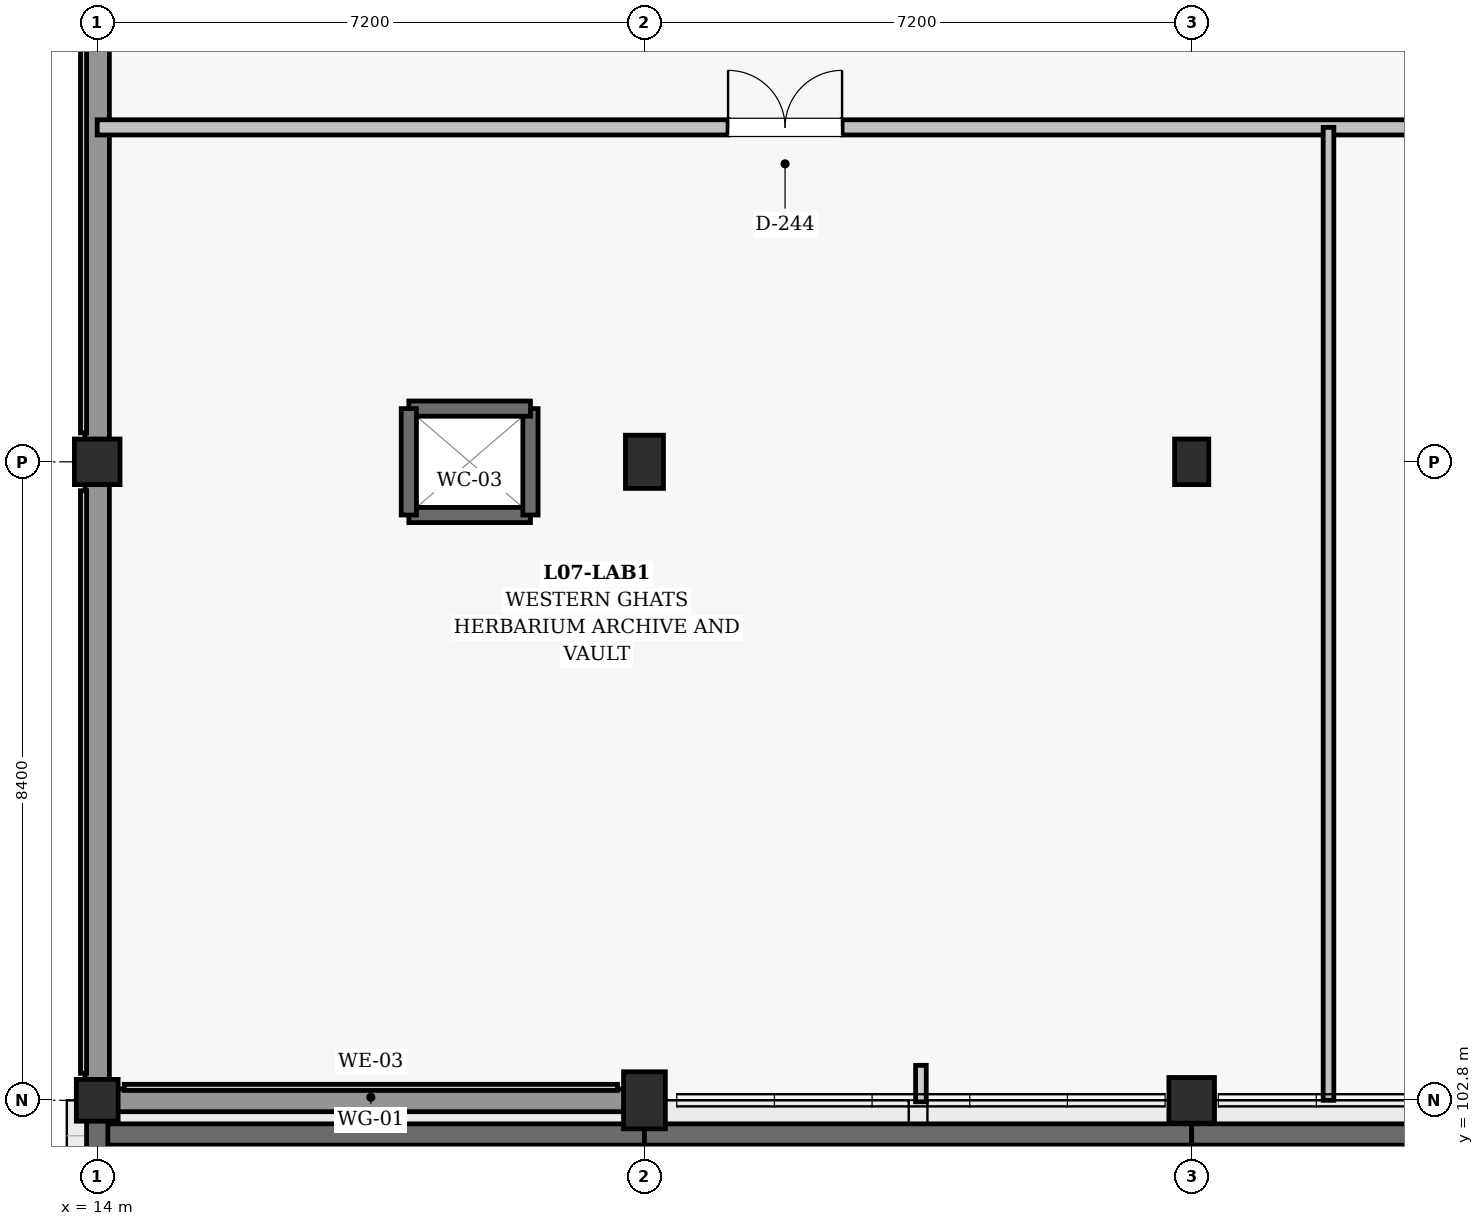
"""IFC4 building model, lengths in metres.
Left out: names, types, materials, properties, quantities, classifications, styles, units other than length and angle.
Written with IfcOpenShell. Run it as: python <this file> out.ifc"""

import sys

from ifc_helpers import new_model, si_unit, direction, frame, frame_2d, origin, origin_2d, place, context, subcontext, project, spatial, polyline, rectangle, outline, extrude, element, fill, save


model = new_model("IFC4")
c1 = context("Model", 3, precision=1e-05, world=origin(), true_north=direction((0.0, 1.0)))
c2 = subcontext(c1, "Body", "Model", "MODEL_VIEW")
j1 = project(units=[si_unit("LENGTHUNIT", "METRE"), si_unit("PLANEANGLEUNIT", "RADIAN")], contexts=[c1])
p1 = place(None, origin())
s1 = spatial("IfcSite", under=j1, at=p1, CompositionType="ELEMENT")
p2 = place(p1, origin())
s2 = spatial("IfcBuilding", under=s1, at=p2, CompositionType="ELEMENT")
p3 = place(p2, frame((0.0, 0.0, 32.4)))
s3 = spatial("IfcBuildingStorey", under=s2, at=p3, CompositionType="ELEMENT", Elevation=32.4)
p4 = place(p3, frame((14.0, 102.8, 0.0), z_axis=(0.0, 0.0, 1.0), x_axis=(1.0, 0.0, 0.0)))
e1 = element("IfcColumn", 1, at=p4, inside=s3, PredefinedType="COLUMN", context=c2, shape_type="SweptSolid", body=[
    extrude(rectangle(XDim=0.55, YDim=0.55, at=origin_2d()), origin(), (0.0, 0.0, 1.0), 4.5),
])
p5 = place(p3, frame((14.0, 111.2, 0.0), z_axis=(0.0, 0.0, 1.0), x_axis=(1.0, 0.0, 0.0)))
e2 = element("IfcColumn", 2, at=p5, inside=s3, PredefinedType="COLUMN", context=c2, shape_type="SweptSolid", body=[
    extrude(rectangle(XDim=0.6, YDim=0.6, at=origin_2d()), origin(), (0.0, 0.0, 1.0), 4.5),
])
p6 = place(p3, frame((21.2, 102.8, 0.0), z_axis=(0.0, 0.0, 1.0), x_axis=(1.0, 0.0, 0.0)))
e3 = element("IfcColumn", 3, at=p6, inside=s3, PredefinedType="COLUMN", context=c2, shape_type="SweptSolid", body=[
    extrude(rectangle(XDim=0.55, YDim=0.75, at=origin_2d()), origin(), (0.0, 0.0, 1.0), 4.5),
])
p7 = place(p3, frame((21.2, 111.2, 0.0), z_axis=(0.0, 0.0, 1.0), x_axis=(1.0, 0.0, 0.0)))
e4 = element("IfcColumn", 4, at=p7, inside=s3, PredefinedType="COLUMN", context=c2, shape_type="SweptSolid", body=[
    extrude(rectangle(XDim=0.5, YDim=0.7, at=origin_2d()), origin(), (0.0, 0.0, 1.0), 4.5),
])
p8 = place(p3, frame((28.4, 102.8, 0.0), z_axis=(0.0, 0.0, 1.0), x_axis=(1.0, 0.0, 0.0)))
e5 = element("IfcColumn", 5, at=p8, inside=s3, PredefinedType="COLUMN", context=c2, shape_type="SweptSolid", body=[
    extrude(rectangle(XDim=0.6, YDim=0.6, at=origin_2d()), origin(), (0.0, 0.0, 1.0), 4.5),
])
p9 = place(p3, frame((28.4, 111.2, 0.0), z_axis=(0.0, 0.0, 1.0), x_axis=(1.0, 0.0, 0.0)))
e6 = element("IfcColumn", 6, at=p9, inside=s3, PredefinedType="COLUMN", context=c2, shape_type="SweptSolid", body=[
    extrude(rectangle(XDim=0.45, YDim=0.6, at=origin_2d()), origin(), (0.0, 0.0, 1.0), 4.5),
])
p10 = place(p3, frame((14.255, 102.8, 0.0), z_axis=(0.0, 0.0, 1.0), x_axis=(1.0, 0.0, 0.0)))
e7 = element("IfcWall", 7, at=p10, inside=s3, PredefinedType="SOLIDWALL", context=c2, shape_type="SweptSolid", body=[
    extrude(rectangle(XDim=6.69, YDim=0.3, at=frame_2d((3.345, 0.0))), origin(), (0.0, 0.0, 1.0), 3.355),
])
p11 = place(p3, frame((14.0, 103.055, 0.0), z_axis=(0.0, 0.0, 1.0), x_axis=(0.0, 1.0, 0.0)))
e8 = element("IfcWall", 8, at=p11, inside=s3, PredefinedType="SOLIDWALL", context=c2, shape_type="SweptSolid", body=[
    extrude(rectangle(XDim=7.865, YDim=0.32, at=frame_2d((3.933, 0.0))), origin(), (0.0, 0.0, 1.0), 3.355),
])
p12 = place(p3, frame((14.0, 111.48, 0.0), z_axis=(0.0, 0.0, 1.0), x_axis=(0.0, 1.0, 0.0)))
e9 = element("IfcWall", 9, at=p12, inside=s3, PredefinedType="SOLIDWALL", context=c2, shape_type="SweptSolid", body=[
    extrude(rectangle(XDim=7.765, YDim=0.32, at=frame_2d((3.883, 0.0))), origin(), (0.0, 0.0, 1.0), 3.405),
])
for number, where, z_axis, x_axis in (
    (10, (14.0, 102.35, 0.0), (0.0, 0.0, 1.0), (1.0, 0.0, 0.0)),
    (11, (21.2, 102.35, 0.0), (0.0, 0.0, 1.0), (1.0, 0.0, 0.0)),
):
    element("IfcWall", number, at=place(p3, frame(where, z_axis=z_axis, x_axis=x_axis)), inside=s3, PredefinedType="SOLIDWALL", context=c2, shape_type="SweptSolid", body=[
        extrude(outline(polyline([(0.0, 0.0), (7.2, 0.0), (7.2, 0.15), (3.6, 2.78), (0.0, 0.15), (0.0, 0.0)])), frame((0.0, 0.14, 0.0), z_axis=(0.0, -1.0, 0.0), x_axis=(1.0, 0.0, 0.0)), (0.0, 0.0, 1.0), 0.28),
    ])
p13 = place(p3, frame((28.4, 102.35, 0.0), z_axis=(0.0, 0.0, 1.0), x_axis=(1.0, 0.0, 0.0)))
e12 = element("IfcWall", 12, at=p13, inside=s3, PredefinedType="SOLIDWALL", context=c2, shape_type="SweptSolid", body=[
    extrude(outline(polyline([(0.0, 0.0), (7.2, 0.0), (7.2, 0.15), (3.6, 2.78), (0.0, 0.15), (0.0, 0.0)])), frame((0.0, 0.14, 0.0), z_axis=(0.0, -1.0, 0.0), x_axis=(1.0, 0.0, 0.0)), (0.0, 0.0, 1.0), 0.28),
])
p14 = place(p3, frame((14.0, 94.4, 0.0), z_axis=(0.0, 0.0, 1.0), x_axis=(0.0, 1.0, 0.0)))
e13 = element("IfcWall", 13, at=p14, inside=s3, PredefinedType="SOLIDWALL", context=c2, shape_type="SweptSolid", body=[
    extrude(outline(polyline([(0.0, 0.0), (8.4, 0.0), (8.4, 0.8), (4.2, 2.45), (0.0, 0.8), (0.0, 0.0)])), frame((0.0, 0.14, 0.0), z_axis=(0.0, -1.0, 0.0), x_axis=(1.0, 0.0, 0.0)), (0.0, 0.0, 1.0), 0.28),
])
p15 = place(p3, frame((18.1, 110.5, 0.0), z_axis=(0.0, 0.0, 1.0), x_axis=(1.0, 0.0, 0.0)))
e14 = element("IfcWall", 14, at=p15, inside=s3, PredefinedType="SHEAR", context=c2, shape_type="SweptSolid", body=[
    extrude(rectangle(XDim=1.6, YDim=0.2, at=frame_2d((0.8, 0.0))), origin(), (0.0, 0.0, 1.0), 4.14),
])
p16 = place(p3, frame((19.7, 110.5, 0.0), z_axis=(0.0, 0.0, 1.0), x_axis=(0.0, 1.0, 0.0)))
e15 = element("IfcWall", 15, at=p16, inside=s3, PredefinedType="SHEAR", context=c2, shape_type="SweptSolid", body=[
    extrude(rectangle(XDim=1.4, YDim=0.2, at=frame_2d((0.7, 0.0))), origin(), (0.0, 0.0, 1.0), 4.14),
])
p17 = place(p3, frame((19.7, 111.9, 0.0), z_axis=(0.0, 0.0, 1.0), x_axis=(-1.0, 0.0, 0.0)))
e16 = element("IfcWall", 16, at=p17, inside=s3, PredefinedType="SHEAR", context=c2, shape_type="SweptSolid", body=[
    extrude(rectangle(XDim=1.6, YDim=0.2, at=frame_2d((0.8, 0.0))), origin(), (0.0, 0.0, 1.0), 4.14),
])
p18 = place(p3, frame((18.1, 111.9, 0.0), z_axis=(0.0, 0.0, 1.0), x_axis=(0.0, -1.0, 0.0)))
e17 = element("IfcWall", 17, at=p18, inside=s3, PredefinedType="SHEAR", context=c2, shape_type="SweptSolid", body=[
    extrude(rectangle(XDim=1.4, YDim=0.2, at=frame_2d((0.7, 0.0))), origin(), (0.0, 0.0, 1.0), 4.14),
])
p19 = place(p3, frame((14.0, 115.6, 0.0), z_axis=(0.0, 0.0, 1.0), x_axis=(1.0, 0.0, 0.0)))
e18 = element("IfcWall", 18, at=p19, inside=s3, PredefinedType="SOLIDWALL", context=c2, shape_type="SweptSolid", body=[
    extrude(rectangle(XDim=86.4, YDim=0.2, at=frame_2d((43.2, 0.0))), origin(), (0.0, 0.0, 1.0), 2.96),
])
p20 = place(p19, frame((29.9, 0.0, 0.0)))
e19 = element("IfcOpeningElement", 19, at=p20, cuts=e18, PredefinedType="OPENING", context=c2, shape_type="SweptSolid", body=[
    extrude(rectangle(XDim=1.1, YDim=2.15, at=frame_2d((0.55, 1.075))), frame((0.0, 0.11, 0.0), z_axis=(0.0, -1.0, 0.0), x_axis=(1.0, 0.0, 0.0)), (0.0, 0.0, 1.0), 0.22),
])
p21 = place(p19, frame((8.3, 0.0, 0.0)))
e20 = element("IfcOpeningElement", 20, at=p21, cuts=e18, PredefinedType="OPENING", context=c2, shape_type="SweptSolid", body=[
    extrude(rectangle(XDim=1.5, YDim=2.2, at=frame_2d((0.75, 1.1))), frame((0.0, 0.11, 0.0), z_axis=(0.0, -1.0, 0.0), x_axis=(1.0, 0.0, 0.0)), (0.0, 0.0, 1.0), 0.22),
])
p22 = place(p19, frame((24.7, 0.0, 0.0)))
e21 = element("IfcOpeningElement", 21, at=p22, cuts=e18, PredefinedType="OPENING", context=c2, shape_type="SweptSolid", body=[
    extrude(rectangle(XDim=1.5, YDim=2.2, at=frame_2d((0.75, 1.1))), frame((0.0, 0.11, 0.0), z_axis=(0.0, -1.0, 0.0), x_axis=(1.0, 0.0, 0.0)), (0.0, 0.0, 1.0), 0.22),
])
p23 = place(p19, frame((45.0, 0.0, 0.0)))
e22 = element("IfcOpeningElement", 22, at=p23, cuts=e18, PredefinedType="OPENING", context=c2, shape_type="SweptSolid", body=[
    extrude(rectangle(XDim=1.5, YDim=2.2, at=frame_2d((0.75, 1.1))), frame((0.0, 0.11, 0.0), z_axis=(0.0, -1.0, 0.0), x_axis=(1.0, 0.0, 0.0)), (0.0, 0.0, 1.0), 0.22),
])
p24 = place(p19, frame((62.1, 0.0, 0.0)))
e23 = element("IfcOpeningElement", 23, at=p24, cuts=e18, PredefinedType="OPENING", context=c2, shape_type="SweptSolid", body=[
    extrude(rectangle(XDim=1.5, YDim=2.2, at=frame_2d((0.75, 1.1))), frame((0.0, 0.11, 0.0), z_axis=(0.0, -1.0, 0.0), x_axis=(1.0, 0.0, 0.0)), (0.0, 0.0, 1.0), 0.22),
])
p25 = place(p19, frame((80.1, 0.0, 0.0)))
e24 = element("IfcOpeningElement", 24, at=p25, cuts=e18, PredefinedType="OPENING", context=c2, shape_type="SweptSolid", body=[
    extrude(rectangle(XDim=1.1, YDim=2.15, at=frame_2d((0.55, 1.075))), frame((0.0, 0.11, 0.0), z_axis=(0.0, -1.0, 0.0), x_axis=(1.0, 0.0, 0.0)), (0.0, 0.0, 1.0), 0.22),
])
p26 = place(p3, frame((30.2, 102.8, 0.0), z_axis=(0.0, 0.0, 1.0), x_axis=(0.0, 1.0, 0.0)))
e25 = element("IfcWall", 25, at=p26, inside=s3, PredefinedType="PARTITIONING", context=c2, shape_type="SweptSolid", body=[
    extrude(rectangle(XDim=12.8, YDim=0.14, at=frame_2d((6.4, 0.0))), origin(), (0.0, 0.0, 1.0), 3.41),
])
p27 = place(p21, origin())
e26 = element("IfcDoor", 26, at=p27, inside=s3, OperationType="DOUBLE_DOOR_SINGLE_SWING", PredefinedType="DOOR", context=c2, shape_type="SweptSolid", body=[
    extrude(rectangle(XDim=1.5, YDim=2.2, at=frame_2d((0.75, 1.1))), frame((0.0, 0.025, 0.0), z_axis=(0.0, -1.0, 0.0), x_axis=(1.0, 0.0, 0.0)), (0.0, 0.0, 1.0), 0.05),
])
fill(e20, e26)
save(model, sys.argv[1])
